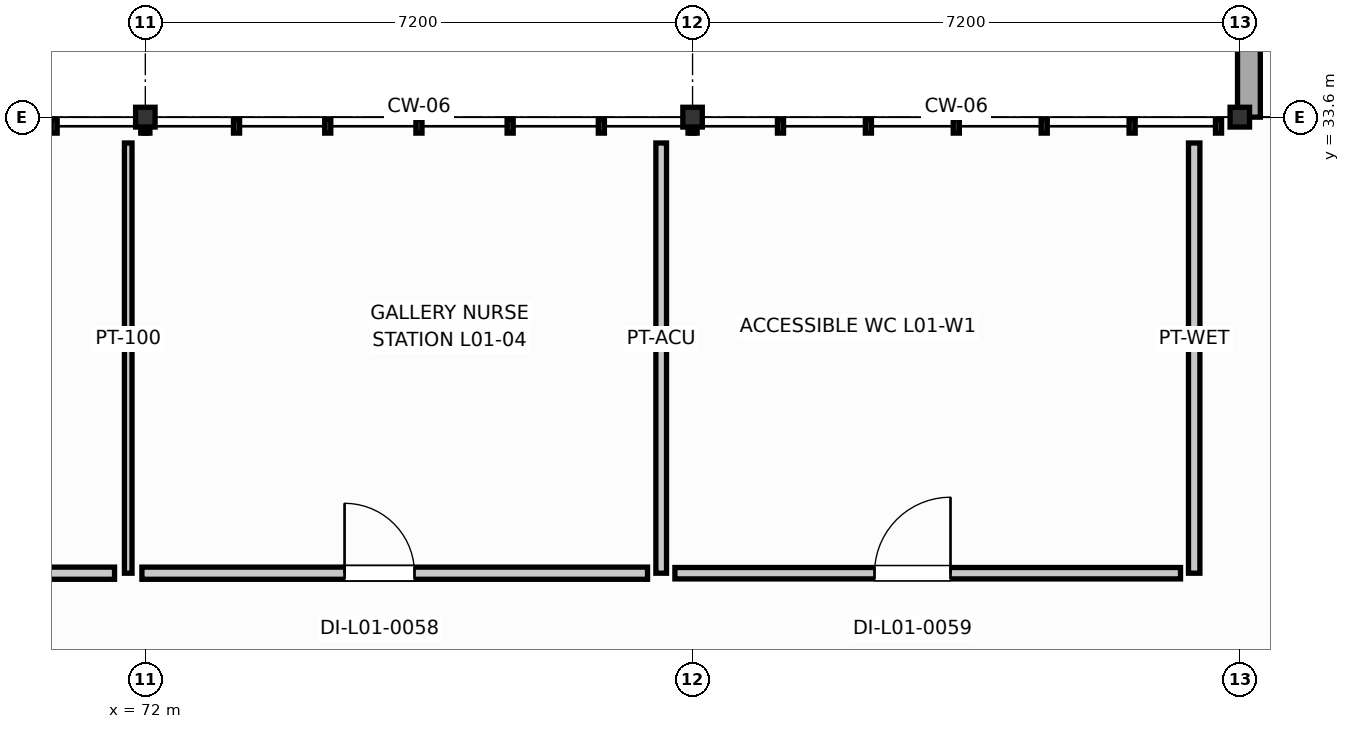
"""IFC4 building model, lengths in metres.
Left out: names, types, materials, properties, quantities, classifications, styles, units other than length and angle.
Written with IfcOpenShell. Run it as: python <this file> out.ifc"""

import sys

from ifc_helpers import new_model, si_unit, direction, frame, frame_2d, origin, origin_2d, place, context, subcontext, project, spatial, rectangle, i_section, extrude, element, fill, save


model = new_model("IFC4")
c1 = context("Model", 3, precision=1e-05, world=origin(), true_north=direction((0.0, 1.0)))
c2 = subcontext(c1, "Body", "Model", "MODEL_VIEW")
j1 = project(units=[si_unit("LENGTHUNIT", "METRE"), si_unit("PLANEANGLEUNIT", "RADIAN")], contexts=[c1])
p1 = place(None, origin())
s1 = spatial("IfcSite", under=j1, at=p1, CompositionType="ELEMENT")
p2 = place(p1, origin())
s2 = spatial("IfcBuilding", under=s1, at=p2, CompositionType="ELEMENT")
p3 = place(p2, frame((0.0, 0.0, 4.8)))
s3 = spatial("IfcBuildingStorey", under=s2, at=p3, CompositionType="ELEMENT", Elevation=4.8)
for number, where, z_axis, x_axis in (
    (1, (72.0, 33.6, 0.0), (0.0, 0.0, 1.0), (1.0, 0.0, 0.0)),
    (2, (79.2, 33.6, 0.0), (0.0, 0.0, 1.0), (1.0, 0.0, 0.0)),
    (3, (86.4, 33.6, 0.0), (0.0, 0.0, 1.0), (1.0, 0.0, 0.0)),
):
    element("IfcColumn", number, at=place(p3, frame(where, z_axis=z_axis, x_axis=x_axis)), inside=s3, PredefinedType="COLUMN", context=c2, shape_type="SweptSolid", body=[
        extrude(i_section(OverallWidth=0.256, OverallDepth=0.26, WebThickness=0.011, FlangeThickness=0.017, FilletRadius=0.013, at=origin_2d()), origin(), (0.0, 0.0, 1.0), 4.2),
    ])
p4 = place(p3, frame((86.52, 33.6, 0.0), z_axis=(0.0, 0.0, 1.0), x_axis=(0.0, 1.0, 0.0)))
e4 = element("IfcWall", 4, at=p4, inside=s3, PredefinedType="SOLIDWALL", context=c2, shape_type="SweptSolid", body=[
    extrude(rectangle(XDim=8.4, YDim=0.3, at=frame_2d((4.2, 0.0))), origin(), (0.0, 0.0, 1.0), 3.015),
])
p5 = place(p4, frame((3.225, 0.0, 0.95)))
e5 = element("IfcOpeningElement", 5, at=p5, cuts=e4, PredefinedType="OPENING", context=c2, shape_type="SweptSolid", body=[
    extrude(rectangle(XDim=1.95, YDim=1.35, at=frame_2d((0.975, 0.675))), frame((0.0, 0.16, 0.0), z_axis=(0.0, -1.0, 0.0), x_axis=(1.0, 0.0, 0.0)), (0.0, 0.0, 1.0), 0.32),
])
p6 = place(p3, frame((71.775, 33.26, 0.0), z_axis=(0.0, 0.0, 1.0), x_axis=(0.0, -1.0, 0.0)))
e6 = element("IfcWall", 6, at=p6, inside=s3, PredefinedType="PARTITIONING", context=c2, shape_type="SweptSolid", body=[
    extrude(rectangle(XDim=5.66, YDim=0.1, at=frame_2d((2.83, 0.0))), origin(), (0.0, 0.0, 1.0), 3.485),
])
p7 = place(p3, frame((71.595, 27.6, 0.0), z_axis=(0.0, 0.0, 1.0), x_axis=(-1.0, 0.0, 0.0)))
e7 = element("IfcWall", 7, at=p7, inside=s3, PredefinedType="PARTITIONING", context=c2, shape_type="SweptSolid", body=[
    extrude(rectangle(XDim=6.653, YDim=0.16, at=frame_2d((3.326, 0.0))), origin(), (0.0, 0.0, 1.0), 3.328),
])
p8 = place(p7, frame((3.046, 0.0, 0.0)))
e8 = element("IfcOpeningElement", 8, at=p8, cuts=e7, PredefinedType="OPENING", context=c2, shape_type="SweptSolid", body=[
    extrude(rectangle(XDim=0.96, YDim=2.1, at=frame_2d((0.48, 1.05))), frame((0.0, 0.09, 0.0), z_axis=(0.0, -1.0, 0.0), x_axis=(1.0, 0.0, 0.0)), (0.0, 0.0, 1.0), 0.18),
])
p9 = place(p3, frame((78.788, 33.26, 0.0), z_axis=(0.0, 0.0, 1.0), x_axis=(0.0, -1.0, 0.0)))
e9 = element("IfcWall", 9, at=p9, inside=s3, PredefinedType="PARTITIONING", context=c2, shape_type="SweptSolid", body=[
    extrude(rectangle(XDim=5.66, YDim=0.14, at=frame_2d((2.83, 0.0))), origin(), (0.0, 0.0, 1.0), 3.945),
])
p10 = place(p3, frame((78.607, 27.6, 0.0), z_axis=(0.0, 0.0, 1.0), x_axis=(-1.0, 0.0, 0.0)))
e10 = element("IfcWall", 10, at=p10, inside=s3, PredefinedType="PARTITIONING", context=c2, shape_type="SweptSolid", body=[
    extrude(rectangle(XDim=6.652, YDim=0.16, at=frame_2d((3.326, 0.0))), origin(), (0.0, 0.0, 1.0), 3.485),
])
p11 = place(p10, frame((3.066, 0.0, 0.0)))
e11 = element("IfcOpeningElement", 11, at=p11, cuts=e10, PredefinedType="OPENING", context=c2, shape_type="SweptSolid", body=[
    extrude(rectangle(XDim=0.92, YDim=2.1, at=frame_2d((0.46, 1.05))), frame((0.0, 0.09, 0.0), z_axis=(0.0, -1.0, 0.0), x_axis=(1.0, 0.0, 0.0)), (0.0, 0.0, 1.0), 0.18),
])
p12 = place(p3, frame((85.8, 33.26, 0.0), z_axis=(0.0, 0.0, 1.0), x_axis=(0.0, -1.0, 0.0)))
e12 = element("IfcWall", 12, at=p12, inside=s3, PredefinedType="PLUMBINGWALL", context=c2, shape_type="SweptSolid", body=[
    extrude(rectangle(XDim=5.66, YDim=0.15, at=frame_2d((2.83, 0.0))), origin(), (0.0, 0.0, 1.0), 3.945),
])
p13 = place(p3, frame((85.62, 27.6, 0.0), z_axis=(0.0, 0.0, 1.0), x_axis=(-1.0, 0.0, 0.0)))
e13 = element("IfcWall", 13, at=p13, inside=s3, PredefinedType="PLUMBINGWALL", context=c2, shape_type="SweptSolid", body=[
    extrude(rectangle(XDim=6.653, YDim=0.15, at=frame_2d((3.326, 0.0))), origin(), (0.0, 0.0, 1.0), 3.175),
])
p14 = place(p13, frame((3.026, 0.0, 0.0)))
e14 = element("IfcOpeningElement", 14, at=p14, cuts=e13, PredefinedType="OPENING", context=c2, shape_type="SweptSolid", body=[
    extrude(rectangle(XDim=1.0, YDim=2.1, at=frame_2d((0.5, 1.05))), frame((0.0, 0.085, 0.0), z_axis=(0.0, -1.0, 0.0), x_axis=(1.0, 0.0, 0.0)), (0.0, 0.0, 1.0), 0.17),
])
p15 = place(p11, frame((0.92, 0.0, 0.0), z_axis=(0.0, 0.0, 1.0), x_axis=(-1.0, 0.0, 0.0)))
e15 = element("IfcDoor", 15, at=p15, inside=s3, OperationType="SINGLE_SWING_LEFT", PredefinedType="DOOR", context=c2, shape_type="SweptSolid", body=[
    extrude(rectangle(XDim=0.92, YDim=2.1, at=frame_2d((0.46, 1.05))), frame((0.0, 0.025, 0.0), z_axis=(0.0, -1.0, 0.0), x_axis=(1.0, 0.0, 0.0)), (0.0, 0.0, 1.0), 0.05),
])
fill(e11, e15)
p16 = place(p14, frame((1.0, 0.0, 0.0), z_axis=(0.0, 0.0, 1.0), x_axis=(-1.0, 0.0, 0.0)))
e16 = element("IfcDoor", 16, at=p16, inside=s3, OperationType="SINGLE_SWING_RIGHT", PredefinedType="DOOR", context=c2, shape_type="SweptSolid", body=[
    extrude(rectangle(XDim=1.0, YDim=2.1, at=frame_2d((0.5, 1.05))), frame((0.0, 0.025, 0.0), z_axis=(0.0, -1.0, 0.0), x_axis=(1.0, 0.0, 0.0)), (0.0, 0.0, 1.0), 0.05),
])
fill(e14, e16)
save(model, sys.argv[1])
